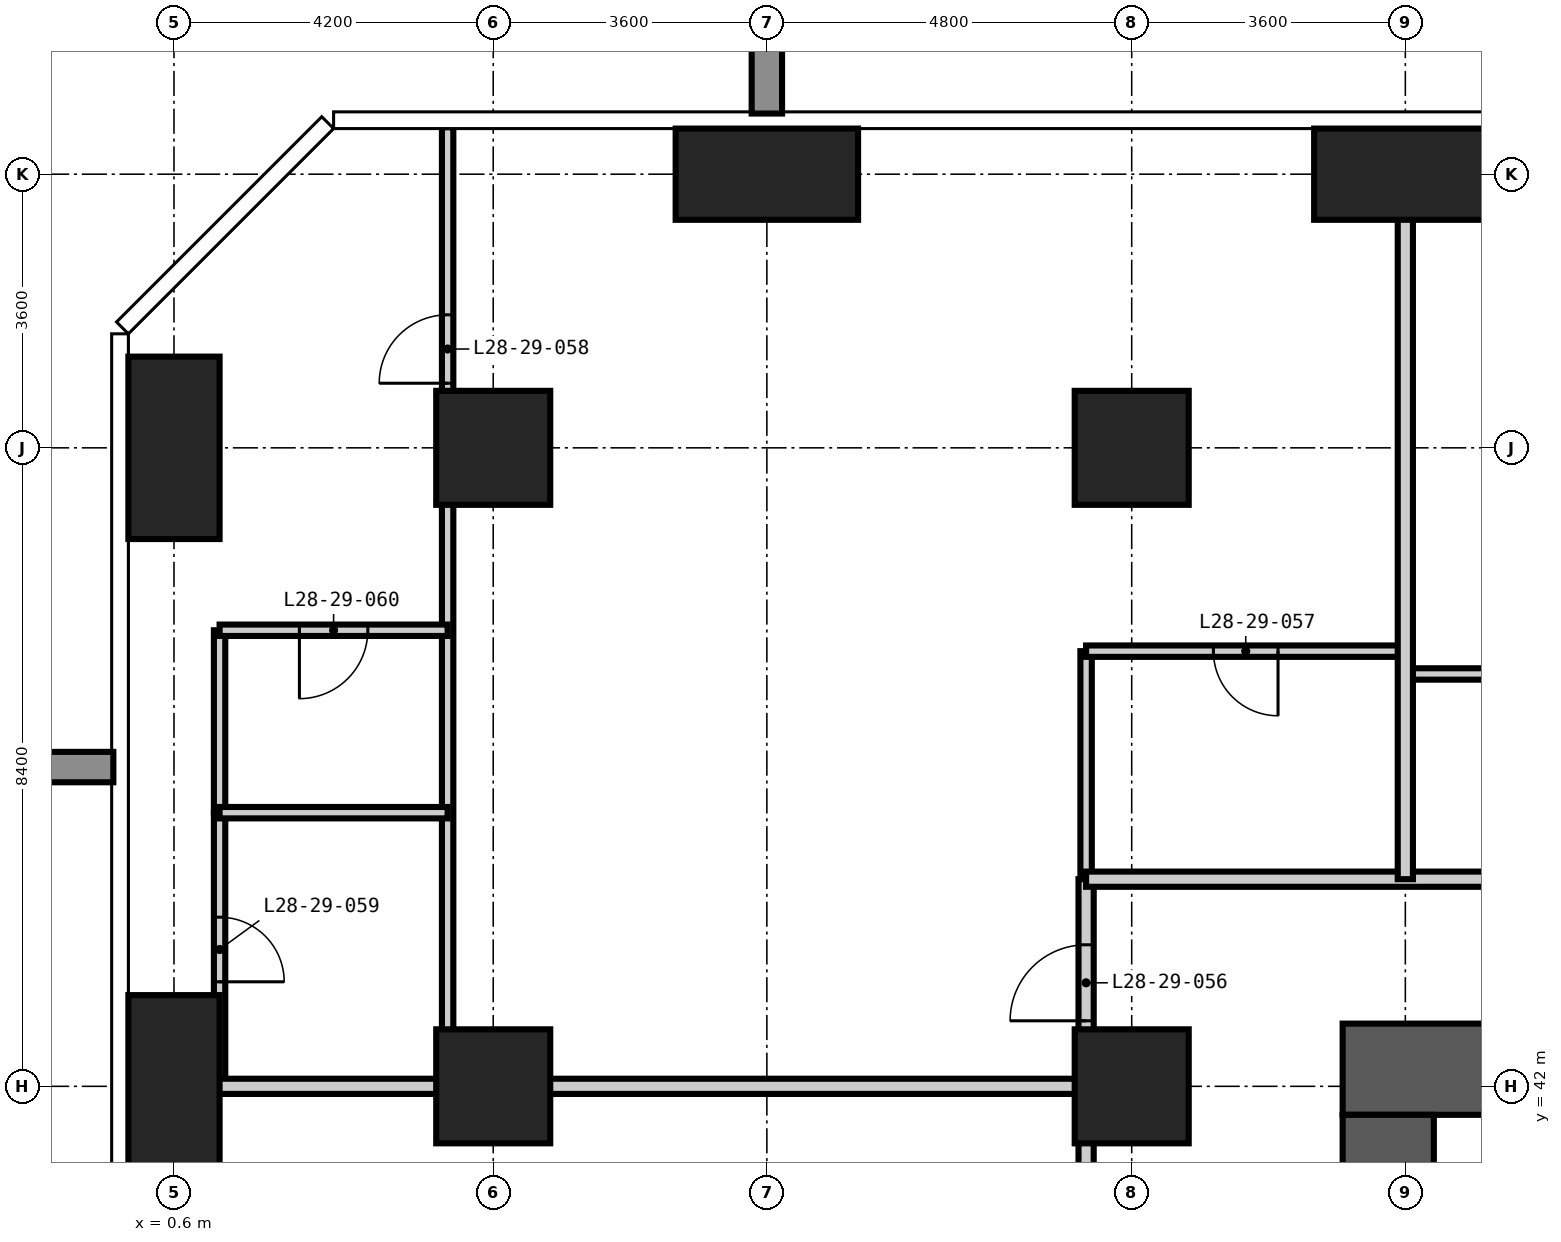
"""IFC4 building model, lengths in metres.
Left out: names, types, materials, properties, quantities, classifications, styles, units other than length and angle.
Written with IfcOpenShell. Run it as: python <this file> out.ifc"""

import sys

from ifc_helpers import new_model, si_unit, direction, frame, frame_2d, origin, origin_2d, place, context, subcontext, project, spatial, rectangle, extrude, element, fill, save


model = new_model("IFC4")
c1 = context("Model", 3, precision=1e-05, world=origin(), true_north=direction((0.0, 1.0)))
c2 = subcontext(c1, "Body", "Model", "MODEL_VIEW")
j1 = project(units=[si_unit("LENGTHUNIT", "METRE"), si_unit("PLANEANGLEUNIT", "RADIAN")], contexts=[c1])
p1 = place(None, origin())
s1 = spatial("IfcSite", under=j1, at=p1, CompositionType="ELEMENT")
p2 = place(p1, origin())
s2 = spatial("IfcBuilding", under=s1, at=p2, CompositionType="ELEMENT")
p3 = place(p2, frame((0.0, 0.0, 111.6)))
s3 = spatial("IfcBuildingStorey", under=s2, at=p3, CompositionType="ELEMENT", Elevation=111.6)
for number, where, z_axis, x_axis in (
    (1, (0.6, 42.0, -0.35), (0.0, 0.0, 1.0), (1.0, 0.0, 0.0)),
    (2, (0.6, 50.4, -0.35), (0.0, 0.0, 1.0), (1.0, 0.0, 0.0)),
):
    element("IfcColumn", number, at=place(p3, frame(where, z_axis=z_axis, x_axis=x_axis)), inside=s3, PredefinedType="COLUMN", context=c2, shape_type="SweptSolid", body=[
        extrude(rectangle(XDim=1.2, YDim=2.4, at=origin_2d()), origin(), (0.0, 0.0, 1.0), 3.6),
    ])
for number, where, z_axis, x_axis in (
    (3, (4.8, 42.0, -0.35), (0.0, 0.0, 1.0), (1.0, 0.0, 0.0)),
    (4, (4.8, 50.4, -0.35), (0.0, 0.0, 1.0), (1.0, 0.0, 0.0)),
):
    element("IfcColumn", number, at=place(p3, frame(where, z_axis=z_axis, x_axis=x_axis)), inside=s3, PredefinedType="COLUMN", context=c2, shape_type="SweptSolid", body=[
        extrude(rectangle(XDim=1.5, YDim=1.5, at=origin_2d()), origin(), (0.0, 0.0, 1.0), 3.6),
    ])
p4 = place(p3, frame((8.4, 54.0, -0.35), z_axis=(0.0, 0.0, 1.0), x_axis=(1.0, 0.0, 0.0)))
e5 = element("IfcColumn", 5, at=p4, inside=s3, PredefinedType="COLUMN", context=c2, shape_type="SweptSolid", body=[
    extrude(rectangle(XDim=2.4, YDim=1.2, at=origin_2d()), origin(), (0.0, 0.0, 1.0), 3.6),
])
for number, where, z_axis, x_axis in (
    (6, (13.2, 42.0, -0.35), (0.0, 0.0, 1.0), (1.0, 0.0, 0.0)),
    (7, (13.2, 50.4, -0.35), (0.0, 0.0, 1.0), (1.0, 0.0, 0.0)),
):
    element("IfcColumn", number, at=place(p3, frame(where, z_axis=z_axis, x_axis=x_axis)), inside=s3, PredefinedType="COLUMN", context=c2, shape_type="SweptSolid", body=[
        extrude(rectangle(XDim=1.5, YDim=1.5, at=origin_2d()), origin(), (0.0, 0.0, 1.0), 3.6),
    ])
p5 = place(p3, frame((16.8, 54.0, -0.35), z_axis=(0.0, 0.0, 1.0), x_axis=(1.0, 0.0, 0.0)))
e8 = element("IfcColumn", 8, at=p5, inside=s3, PredefinedType="COLUMN", context=c2, shape_type="SweptSolid", body=[
    extrude(rectangle(XDim=2.4, YDim=1.2, at=origin_2d()), origin(), (0.0, 0.0, 1.0), 3.6),
])
p6 = place(p3, frame((42.825, 42.225, -0.35), z_axis=(0.0, 0.0, 1.0), x_axis=(-1.0, 0.0, 0.0)))
e9 = element("IfcWall", 9, at=p6, inside=s3, PredefinedType="SHEAR", context=c2, shape_type="SweptSolid", body=[
    extrude(rectangle(XDim=26.85, YDim=1.2, at=frame_2d((13.425, 0.0))), origin(), (0.0, 0.0, 1.0), 3.6),
])
p7 = place(p6, frame((21.325, 0.0, 0.35)))
e10 = element("IfcOpeningElement", 10, at=p7, cuts=e9, PredefinedType="OPENING", context=c2, shape_type="SweptSolid", body=[
    extrude(rectangle(XDim=1.0, YDim=2.1, at=frame_2d((0.5, 1.05))), frame((0.0, 0.61, 0.0), z_axis=(0.0, -1.0, 0.0), x_axis=(1.0, 0.0, 0.0)), (0.0, 0.0, 1.0), 1.22),
])
p8 = place(p6, frame((10.725, 0.0, 0.35)))
e11 = element("IfcOpeningElement", 11, at=p8, cuts=e9, PredefinedType="OPENING", context=c2, shape_type="SweptSolid", body=[
    extrude(rectangle(XDim=1.2, YDim=2.2, at=frame_2d((0.6, 1.1))), frame((0.0, 0.61, 0.0), z_axis=(0.0, -1.0, 0.0), x_axis=(1.0, 0.0, 0.0)), (0.0, 0.0, 1.0), 1.22),
])
p9 = place(p3, frame((16.575, 41.625, -0.35), z_axis=(0.0, 0.0, 1.0), x_axis=(0.0, -1.0, 0.0)))
e12 = element("IfcWall", 12, at=p9, inside=s3, PredefinedType="SHEAR", context=c2, shape_type="SweptSolid", body=[
    extrude(rectangle(XDim=24.45, YDim=1.2, at=frame_2d((12.225, 0.0))), origin(), (0.0, 0.0, 1.0), 3.6),
])
p10 = place(p9, frame((11.325, 0.0, 0.35)))
e13 = element("IfcOpeningElement", 13, at=p10, cuts=e12, PredefinedType="OPENING", context=c2, shape_type="SweptSolid", body=[
    extrude(rectangle(XDim=1.8, YDim=2.2, at=frame_2d((0.9, 1.1))), frame((0.0, 0.61, 0.0), z_axis=(0.0, -1.0, 0.0), x_axis=(1.0, 0.0, 0.0)), (0.0, 0.0, 1.0), 1.22),
])
p11 = place(p9, frame((20.125, 0.0, 0.35)))
e14 = element("IfcOpeningElement", 14, at=p11, cuts=e12, PredefinedType="OPENING", context=c2, shape_type="SweptSolid", body=[
    extrude(rectangle(XDim=1.0, YDim=2.1, at=frame_2d((0.5, 1.05))), frame((0.0, 0.61, 0.0), z_axis=(0.0, -1.0, 0.0), x_axis=(1.0, 0.0, 0.0)), (0.0, 0.0, 1.0), 1.22),
])
p12 = place(p9, frame((5.425, 0.0, 0.35)))
e15 = element("IfcOpeningElement", 15, at=p12, cuts=e12, PredefinedType="OPENING", context=c2, shape_type="SweptSolid", body=[
    extrude(rectangle(XDim=1.0, YDim=2.1, at=frame_2d((0.5, 1.05))), frame((0.0, 0.61, 0.0), z_axis=(0.0, -1.0, 0.0), x_axis=(1.0, 0.0, 0.0)), (0.0, 0.0, 1.0), 1.22),
])
p13 = place(p3, frame((1.2, 42.0, 0.0), z_axis=(0.0, 0.0, 1.0), x_axis=(0.0, 1.0, 0.0)))
e16 = element("IfcWall", 16, at=p13, inside=s3, PredefinedType="PARTITIONING", context=c2, shape_type="SweptSolid", body=[
    extrude(rectangle(XDim=3.6, YDim=0.15, at=frame_2d((1.8, 0.0))), origin(), (0.0, 0.0, 1.0), 3.25),
])
p14 = place(p13, frame((1.375, 0.0, 0.0)))
e17 = element("IfcOpeningElement", 17, at=p14, cuts=e16, PredefinedType="OPENING", context=c2, shape_type="SweptSolid", body=[
    extrude(rectangle(XDim=0.85, YDim=2.1, at=frame_2d((0.425, 1.05))), frame((0.0, 0.085, 0.0), z_axis=(0.0, -1.0, 0.0), x_axis=(1.0, 0.0, 0.0)), (0.0, 0.0, 1.0), 0.17),
])
p15 = place(p3, frame((12.6, 44.725, 0.0), z_axis=(0.0, 0.0, 1.0), x_axis=(0.0, 1.0, 0.0)))
e18 = element("IfcWall", 18, at=p15, inside=s3, PredefinedType="PARTITIONING", context=c2, shape_type="SweptSolid", body=[
    extrude(rectangle(XDim=3.0, YDim=0.15, at=frame_2d((1.5, 0.0))), origin(), (0.0, 0.0, 1.0), 3.25),
])
p16 = place(p3, frame((16.8, 47.425, 0.0), z_axis=(0.0, 0.0, 1.0), x_axis=(1.0, 0.0, 0.0)))
e19 = element("IfcWall", 19, at=p16, inside=s3, PredefinedType="PARTITIONING", context=c2, shape_type="SweptSolid", body=[
    extrude(rectangle(XDim=2.4, YDim=0.15, at=frame_2d((1.2, 0.0))), origin(), (0.0, 0.0, 1.0), 3.25),
])
p17 = place(p3, frame((12.6, 47.725, 0.0), z_axis=(0.0, 0.0, 1.0), x_axis=(1.0, 0.0, 0.0)))
e20 = element("IfcWall", 20, at=p17, inside=s3, PredefinedType="PARTITIONING", context=c2, shape_type="SweptSolid", body=[
    extrude(rectangle(XDim=4.2, YDim=0.15, at=frame_2d((2.1, 0.0))), origin(), (0.0, 0.0, 1.0), 3.25),
])
p18 = place(p17, frame((1.675, 0.0, 0.0)))
e21 = element("IfcOpeningElement", 21, at=p18, cuts=e20, PredefinedType="OPENING", context=c2, shape_type="SweptSolid", body=[
    extrude(rectangle(XDim=0.85, YDim=2.1, at=frame_2d((0.425, 1.05))), frame((0.0, 0.085, 0.0), z_axis=(0.0, -1.0, 0.0), x_axis=(1.0, 0.0, 0.0)), (0.0, 0.0, 1.0), 0.17),
])
p19 = place(p3, frame((12.6, 12.875, 0.0), z_axis=(0.0, 0.0, 1.0), x_axis=(0.0, 1.0, 0.0)))
e22 = element("IfcWall", 22, at=p19, inside=s3, PredefinedType="PARTITIONING", context=c2, shape_type="SweptSolid", body=[
    extrude(rectangle(XDim=31.85, YDim=0.2, at=frame_2d((15.925, 0.0))), origin(), (0.0, 0.0, 1.0), 3.25),
])
p20 = place(p19, frame((8.825, 0.0, 0.0)))
e23 = element("IfcOpeningElement", 23, at=p20, cuts=e22, PredefinedType="OPENING", context=c2, shape_type="SweptSolid", body=[
    extrude(rectangle(XDim=1.0, YDim=2.2, at=frame_2d((0.5, 1.1))), frame((0.0, 0.11, 0.0), z_axis=(0.0, -1.0, 0.0), x_axis=(1.0, 0.0, 0.0)), (0.0, 0.0, 1.0), 0.22),
])
p21 = place(p19, frame((17.225, 0.0, 0.0)))
e24 = element("IfcOpeningElement", 24, at=p21, cuts=e22, PredefinedType="OPENING", context=c2, shape_type="SweptSolid", body=[
    extrude(rectangle(XDim=1.0, YDim=2.2, at=frame_2d((0.5, 1.1))), frame((0.0, 0.11, 0.0), z_axis=(0.0, -1.0, 0.0), x_axis=(1.0, 0.0, 0.0)), (0.0, 0.0, 1.0), 0.22),
])
p22 = place(p19, frame((25.625, 0.0, 0.0)))
e25 = element("IfcOpeningElement", 25, at=p22, cuts=e22, PredefinedType="OPENING", context=c2, shape_type="SweptSolid", body=[
    extrude(rectangle(XDim=1.0, YDim=2.2, at=frame_2d((0.5, 1.1))), frame((0.0, 0.11, 0.0), z_axis=(0.0, -1.0, 0.0), x_axis=(1.0, 0.0, 0.0)), (0.0, 0.0, 1.0), 0.22),
])
p23 = place(p19, frame((1.463, 0.0, 0.0)))
e26 = element("IfcOpeningElement", 26, at=p23, cuts=e22, PredefinedType="OPENING", context=c2, shape_type="SweptSolid", body=[
    extrude(rectangle(XDim=1.0, YDim=2.2, at=frame_2d((0.5, 1.1))), frame((0.0, 0.11, 0.0), z_axis=(0.0, -1.0, 0.0), x_axis=(1.0, 0.0, 0.0)), (0.0, 0.0, 1.0), 0.22),
])
p24 = place(p19, frame((29.987, 0.0, 0.0)))
e27 = element("IfcOpeningElement", 27, at=p24, cuts=e22, PredefinedType="OPENING", context=c2, shape_type="SweptSolid", body=[
    extrude(rectangle(XDim=1.0, YDim=2.2, at=frame_2d((0.5, 1.1))), frame((0.0, 0.11, 0.0), z_axis=(0.0, -1.0, 0.0), x_axis=(1.0, 0.0, 0.0)), (0.0, 0.0, 1.0), 0.22),
])
p25 = place(p3, frame((12.6, 44.725, 0.0), z_axis=(0.0, 0.0, 1.0), x_axis=(1.0, 0.0, 0.0)))
e28 = element("IfcWall", 28, at=p25, inside=s3, PredefinedType="PARTITIONING", context=c2, shape_type="SweptSolid", body=[
    extrude(rectangle(XDim=32.725, YDim=0.2, at=frame_2d((16.362, 0.0))), origin(), (0.0, 0.0, 1.0), 3.25),
])
p26 = place(p25, frame((9.1, 0.0, 0.0)))
e29 = element("IfcOpeningElement", 29, at=p26, cuts=e28, PredefinedType="OPENING", context=c2, shape_type="SweptSolid", body=[
    extrude(rectangle(XDim=1.0, YDim=2.2, at=frame_2d((0.5, 1.1))), frame((0.0, 0.11, 0.0), z_axis=(0.0, -1.0, 0.0), x_axis=(1.0, 0.0, 0.0)), (0.0, 0.0, 1.0), 0.22),
])
p27 = place(p25, frame((17.5, 0.0, 0.0)))
e30 = element("IfcOpeningElement", 30, at=p27, cuts=e28, PredefinedType="OPENING", context=c2, shape_type="SweptSolid", body=[
    extrude(rectangle(XDim=1.0, YDim=2.2, at=frame_2d((0.5, 1.1))), frame((0.0, 0.11, 0.0), z_axis=(0.0, -1.0, 0.0), x_axis=(1.0, 0.0, 0.0)), (0.0, 0.0, 1.0), 0.22),
])
p28 = place(p25, frame((25.9, 0.0, 0.0)))
e31 = element("IfcOpeningElement", 31, at=p28, cuts=e28, PredefinedType="OPENING", context=c2, shape_type="SweptSolid", body=[
    extrude(rectangle(XDim=1.0, YDim=2.2, at=frame_2d((0.5, 1.1))), frame((0.0, 0.11, 0.0), z_axis=(0.0, -1.0, 0.0), x_axis=(1.0, 0.0, 0.0)), (0.0, 0.0, 1.0), 0.22),
])
p29 = place(p3, frame((16.8, 44.725, 0.0), z_axis=(0.0, 0.0, 1.0), x_axis=(0.0, 1.0, 0.0)))
e32 = element("IfcWall", 32, at=p29, inside=s3, PredefinedType="PARTITIONING", context=c2, shape_type="SweptSolid", body=[
    extrude(rectangle(XDim=9.893, YDim=0.2, at=frame_2d((4.946, 0.0))), origin(), (0.0, 0.0, 1.0), 3.25),
])
p30 = place(p3, frame((-0.018, 42.0, 0.0), z_axis=(0.0, 0.0, 1.0), x_axis=(1.0, 0.0, 0.0)))
e33 = element("IfcWall", 33, at=p30, inside=s3, PredefinedType="PARTITIONING", context=c2, shape_type="SweptSolid", body=[
    extrude(rectangle(XDim=12.618, YDim=0.2, at=frame_2d((6.309, 0.0))), origin(), (0.0, 0.0, 1.0), 3.25),
])
p31 = place(p3, frame((1.2, 45.6, 0.0), z_axis=(0.0, 0.0, 1.0), x_axis=(0.0, 1.0, 0.0)))
e34 = element("IfcWall", 34, at=p31, inside=s3, PredefinedType="PARTITIONING", context=c2, shape_type="SweptSolid", body=[
    extrude(rectangle(XDim=2.4, YDim=0.15, at=frame_2d((1.2, 0.0))), origin(), (0.0, 0.0, 1.0), 3.25),
])
p32 = place(p3, frame((4.2, 42.0, 0.0), z_axis=(0.0, 0.0, 1.0), x_axis=(0.0, 1.0, 0.0)))
e35 = element("IfcWall", 35, at=p32, inside=s3, PredefinedType="PARTITIONING", context=c2, shape_type="SweptSolid", body=[
    extrude(rectangle(XDim=12.618, YDim=0.15, at=frame_2d((6.309, 0.0))), origin(), (0.0, 0.0, 1.0), 3.25),
])
p33 = place(p32, frame((9.25, 0.0, 0.0)))
e36 = element("IfcOpeningElement", 36, at=p33, cuts=e35, PredefinedType="OPENING", context=c2, shape_type="SweptSolid", body=[
    extrude(rectangle(XDim=0.9, YDim=2.1, at=frame_2d((0.45, 1.05))), frame((0.0, 0.085, 0.0), z_axis=(0.0, -1.0, 0.0), x_axis=(1.0, 0.0, 0.0)), (0.0, 0.0, 1.0), 0.17),
])
p34 = place(p3, frame((1.2, 45.6, 0.0), z_axis=(0.0, 0.0, 1.0), x_axis=(1.0, 0.0, 0.0)))
e37 = element("IfcWall", 37, at=p34, inside=s3, PredefinedType="PARTITIONING", context=c2, shape_type="SweptSolid", body=[
    extrude(rectangle(XDim=3.0, YDim=0.15, at=frame_2d((1.5, 0.0))), origin(), (0.0, 0.0, 1.0), 3.25),
])
p35 = place(p3, frame((1.2, 48.0, 0.0), z_axis=(0.0, 0.0, 1.0), x_axis=(1.0, 0.0, 0.0)))
e38 = element("IfcWall", 38, at=p35, inside=s3, PredefinedType="PARTITIONING", context=c2, shape_type="SweptSolid", body=[
    extrude(rectangle(XDim=3.0, YDim=0.15, at=frame_2d((1.5, 0.0))), origin(), (0.0, 0.0, 1.0), 3.25),
])
p36 = place(p35, frame((1.05, 0.0, 0.0)))
e39 = element("IfcOpeningElement", 39, at=p36, cuts=e38, PredefinedType="OPENING", context=c2, shape_type="SweptSolid", body=[
    extrude(rectangle(XDim=0.9, YDim=2.1, at=frame_2d((0.45, 1.05))), frame((0.0, 0.085, 0.0), z_axis=(0.0, -1.0, 0.0), x_axis=(1.0, 0.0, 0.0)), (0.0, 0.0, 1.0), 0.17),
])
p37 = place(p24, origin())
e40 = element("IfcDoor", 40, at=p37, inside=s3, OperationType="SINGLE_SWING_LEFT", PredefinedType="DOOR", context=c2, shape_type="SweptSolid", body=[
    extrude(rectangle(XDim=1.0, YDim=2.2, at=frame_2d((0.5, 1.1))), frame((0.0, 0.025, 0.0), z_axis=(0.0, -1.0, 0.0), x_axis=(1.0, 0.0, 0.0)), (0.0, 0.0, 1.0), 0.05),
])
fill(e27, e40)
p38 = place(p18, frame((0.85, 0.0, 0.0), z_axis=(0.0, 0.0, 1.0), x_axis=(-1.0, 0.0, 0.0)))
e41 = element("IfcDoor", 41, at=p38, inside=s3, OperationType="SINGLE_SWING_LEFT", PredefinedType="DOOR", context=c2, shape_type="SweptSolid", body=[
    extrude(rectangle(XDim=0.85, YDim=2.1, at=frame_2d((0.425, 1.05))), frame((0.0, 0.025, 0.0), z_axis=(0.0, -1.0, 0.0), x_axis=(1.0, 0.0, 0.0)), (0.0, 0.0, 1.0), 0.05),
])
fill(e21, e41)
p39 = place(p33, origin())
e42 = element("IfcDoor", 42, at=p39, inside=s3, OperationType="SINGLE_SWING_LEFT", PredefinedType="DOOR", context=c2, shape_type="SweptSolid", body=[
    extrude(rectangle(XDim=0.9, YDim=2.1, at=frame_2d((0.45, 1.05))), frame((0.0, 0.025, 0.0), z_axis=(0.0, -1.0, 0.0), x_axis=(1.0, 0.0, 0.0)), (0.0, 0.0, 1.0), 0.05),
])
fill(e36, e42)
p40 = place(p14, frame((0.85, 0.0, 0.0), z_axis=(0.0, 0.0, 1.0), x_axis=(-1.0, 0.0, 0.0)))
e43 = element("IfcDoor", 43, at=p40, inside=s3, OperationType="SINGLE_SWING_RIGHT", PredefinedType="DOOR", context=c2, shape_type="SweptSolid", body=[
    extrude(rectangle(XDim=0.85, YDim=2.1, at=frame_2d((0.425, 1.05))), frame((0.0, 0.025, 0.0), z_axis=(0.0, -1.0, 0.0), x_axis=(1.0, 0.0, 0.0)), (0.0, 0.0, 1.0), 0.05),
])
fill(e17, e43)
p41 = place(p36, frame((0.9, 0.0, 0.0), z_axis=(0.0, 0.0, 1.0), x_axis=(-1.0, 0.0, 0.0)))
e44 = element("IfcDoor", 44, at=p41, inside=s3, OperationType="SINGLE_SWING_RIGHT", PredefinedType="DOOR", context=c2, shape_type="SweptSolid", body=[
    extrude(rectangle(XDim=0.9, YDim=2.1, at=frame_2d((0.45, 1.05))), frame((0.0, 0.025, 0.0), z_axis=(0.0, -1.0, 0.0), x_axis=(1.0, 0.0, 0.0)), (0.0, 0.0, 1.0), 0.05),
])
fill(e39, e44)
save(model, sys.argv[1])
